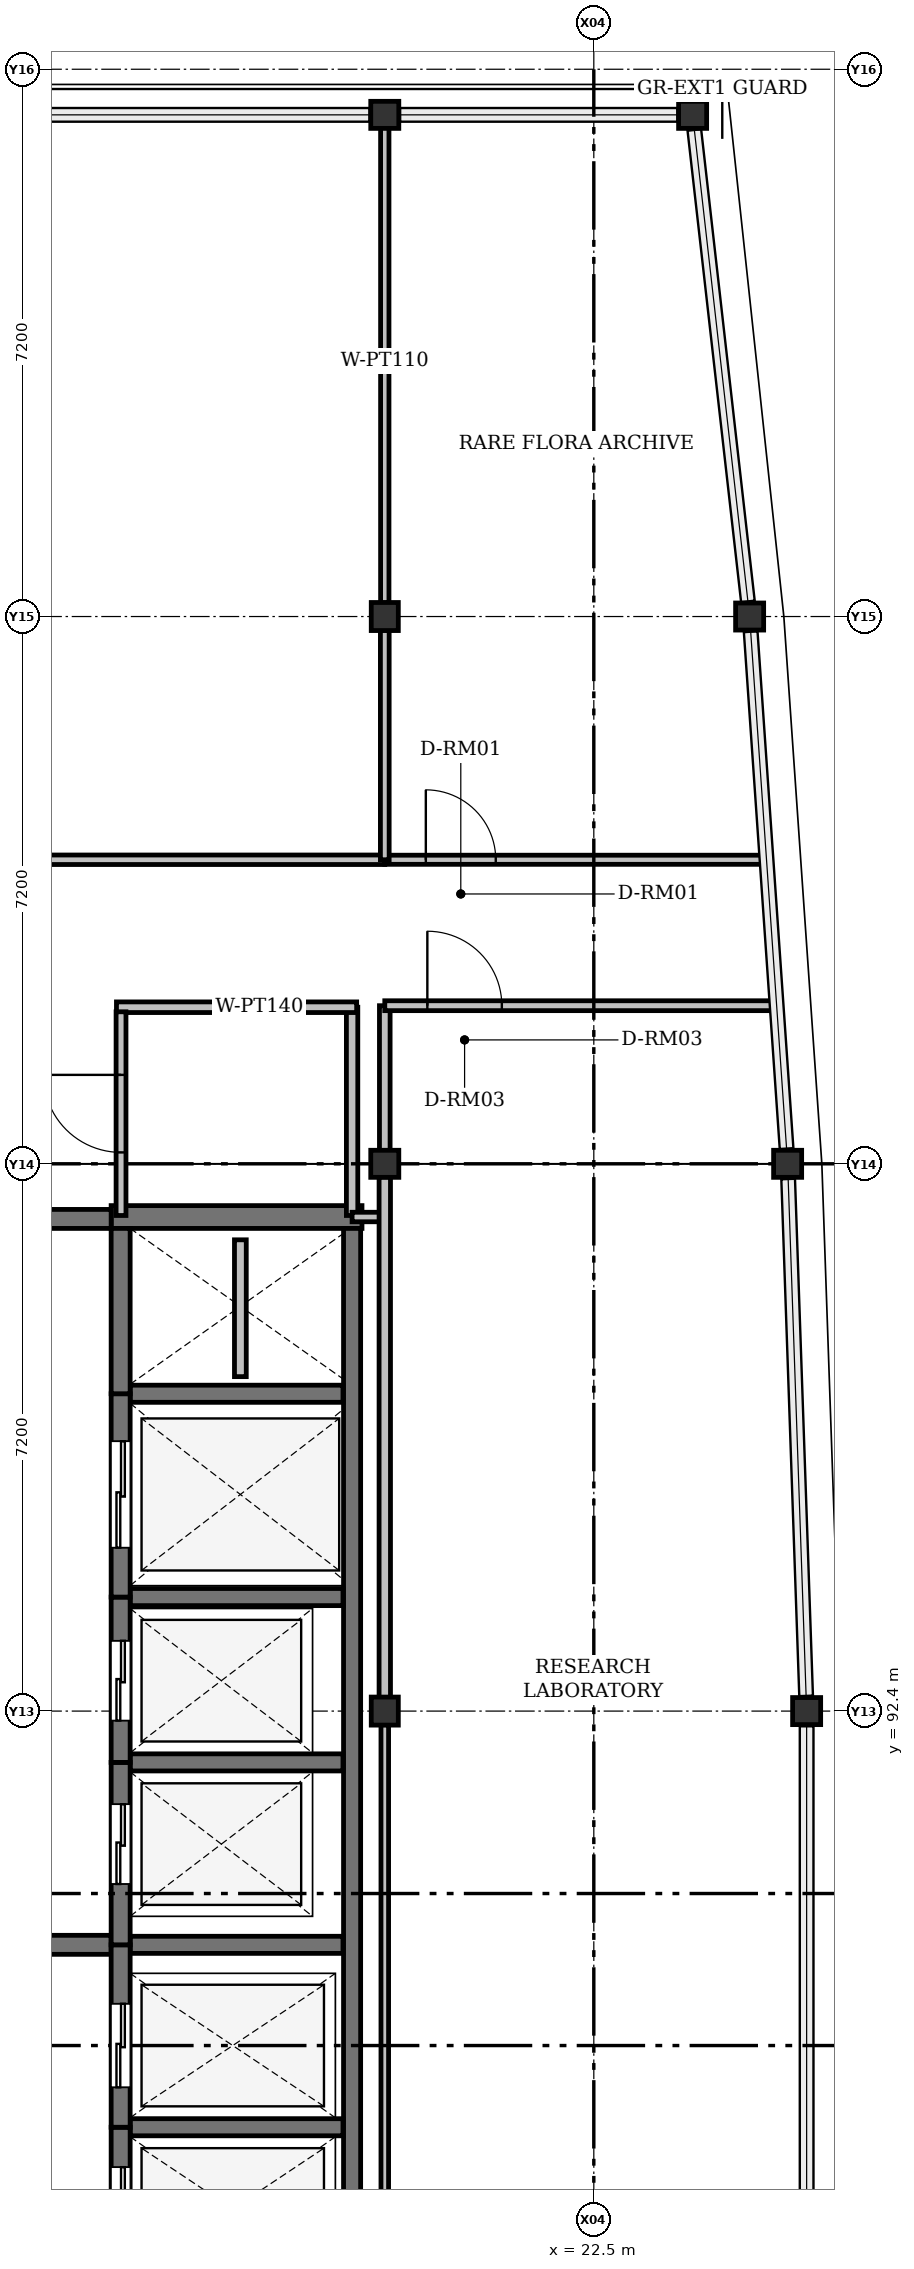
"""IFC4 building model, lengths in metres.
Left out: names, types, materials, properties, quantities, classifications, styles, units other than length and angle.
Written with IfcOpenShell. Run it as: python <this file> out.ifc"""

import sys

from ifc_helpers import new_model, si_unit, direction, frame, frame_2d, origin, origin_2d, place, context, subcontext, project, spatial, rectangle, i_section, extrude, element, fill, save


model = new_model("IFC4")
c1 = context("Model", 3, precision=1e-05, world=origin(), true_north=direction((0.0, 1.0)))
c2 = subcontext(c1, "Body", "Model", "MODEL_VIEW")
j1 = project(units=[si_unit("LENGTHUNIT", "METRE"), si_unit("PLANEANGLEUNIT", "RADIAN")], contexts=[c1])
p1 = place(None, origin())
s1 = spatial("IfcSite", under=j1, at=p1, CompositionType="ELEMENT")
p2 = place(p1, origin())
s2 = spatial("IfcBuilding", under=s1, at=p2, CompositionType="ELEMENT")
p3 = place(p2, frame((0.0, 0.0, 56.1)))
s3 = spatial("IfcBuildingStorey", under=s2, at=p3, CompositionType="ELEMENT", Elevation=56.1)
for number, where, z_axis, x_axis in (
    (1, (19.75, 92.4, 0.0), (0.0, 0.0, 1.0), (0.0, 1.0, 0.0)),
    (2, (25.3, 92.4, 0.0), (0.0, 0.0, 1.0), (1.0, 0.0, 0.0)),
    (3, (19.75, 99.6, 0.0), (0.0, 0.0, 1.0), (1.0, 0.0, 0.0)),
    (4, (25.05, 99.6, 0.0), (0.0, 0.0, 1.0), (1.0, 0.0, 0.0)),
    (5, (19.75, 106.8, 0.0), (0.0, 0.0, 1.0), (0.0, 1.0, 0.0)),
    (6, (24.55, 106.8, 0.0), (0.0, 0.0, 1.0), (1.0, 0.0, 0.0)),
    (7, (19.75, 113.4, 0.0), (0.0, 0.0, 1.0), (1.0, 0.0, 0.0)),
    (8, (23.8, 113.4, 0.0), (0.0, 0.0, 1.0), (1.0, 0.0, 0.0)),
):
    element("IfcColumn", number, at=place(p3, frame(where, z_axis=z_axis, x_axis=x_axis)), inside=s3, PredefinedType="COLUMN", context=c2, shape_type="SweptSolid", body=[
        extrude(i_section(OverallWidth=0.369, OverallDepth=0.356, WebThickness=0.011, FlangeThickness=0.018, FilletRadius=0.015, at=origin_2d()), origin(), (0.0, 0.0, 1.0), 4.2),
    ])
p4 = place(p3, frame((16.15, 98.9, 0.0), z_axis=(0.0, 0.0, 1.0), x_axis=(1.0, 0.0, 0.0)))
e9 = element("IfcWall", 9, at=p4, inside=s3, PredefinedType="SHEAR", context=c2, shape_type="SweptSolid", body=[
    extrude(rectangle(XDim=3.3, YDim=0.3, at=frame_2d((1.65, 0.0))), origin(), (0.0, 0.0, 1.0), 4.2),
])
p5 = place(p3, frame((12.12, 98.875, 0.0), z_axis=(0.0, 0.0, 1.0), x_axis=(1.0, 0.0, 0.0)))
e10 = element("IfcWall", 10, at=p5, inside=s3, PredefinedType="SHEAR", context=c2, shape_type="SweptSolid", body=[
    extrude(rectangle(XDim=4.03, YDim=0.25, at=frame_2d((2.015, 0.0))), origin(), (0.0, 0.0, 1.0), 4.2),
])
p6 = place(p5, frame((1.35, 0.0, 0.0)))
e11 = element("IfcOpeningElement", 11, at=p6, cuts=e10, PredefinedType="OPENING", context=c2, shape_type="SweptSolid", body=[
    extrude(rectangle(XDim=1.3, YDim=2.2, at=frame_2d((0.65, 1.1))), frame((0.0, 0.125, 0.0), z_axis=(0.0, -1.0, 0.0), x_axis=(1.0, 0.0, 0.0)), (0.0, 0.0, 1.0), 0.25),
])
p7 = place(p3, frame((12.12, 89.325, 0.0), z_axis=(0.0, 0.0, 1.0), x_axis=(1.0, 0.0, 0.0)))
e12 = element("IfcWall", 12, at=p7, inside=s3, PredefinedType="SHEAR", context=c2, shape_type="SweptSolid", body=[
    extrude(rectangle(XDim=4.03, YDim=0.25, at=frame_2d((2.015, 0.0))), origin(), (0.0, 0.0, 1.0), 4.2),
])
p8 = place(p7, frame((1.35, 0.0, 0.0)))
e13 = element("IfcOpeningElement", 13, at=p8, cuts=e12, PredefinedType="OPENING", context=c2, shape_type="SweptSolid", body=[
    extrude(rectangle(XDim=1.3, YDim=2.2, at=frame_2d((0.65, 1.1))), frame((0.0, 0.125, 0.0), z_axis=(0.0, -1.0, 0.0), x_axis=(1.0, 0.0, 0.0)), (0.0, 0.0, 1.0), 0.25),
])
p9 = place(p3, frame((19.32, 84.8, 0.0), z_axis=(0.0, 0.0, 1.0), x_axis=(0.0, 1.0, 0.0)))
e14 = element("IfcWall", 14, at=p9, inside=s3, PredefinedType="SHEAR", context=c2, shape_type="SweptSolid", body=[
    extrude(rectangle(XDim=13.95, YDim=0.225, at=frame_2d((6.975, 0.0))), origin(), (0.0, 0.0, 1.0), 4.2),
])
for number, where, z_axis, x_axis in (
    (15, (16.4, 86.925, 0.0), (0.0, 0.0, 1.0), (1.0, 0.0, 0.0)),
    (16, (16.4, 89.325, 0.0), (0.0, 0.0, 1.0), (1.0, 0.0, 0.0)),
    (17, (16.4, 91.725, 0.0), (0.0, 0.0, 1.0), (1.0, 0.0, 0.0)),
    (18, (16.4, 93.9, 0.0), (0.0, 0.0, 1.0), (1.0, 0.0, 0.0)),
    (19, (16.4, 96.575, 0.0), (0.0, 0.0, 1.0), (1.0, 0.0, 0.0)),
):
    element("IfcWall", number, at=place(p3, frame(where, z_axis=z_axis, x_axis=x_axis)), inside=s3, PredefinedType="SHEAR", context=c2, shape_type="SweptSolid", body=[
        extrude(rectangle(XDim=2.8, YDim=0.225, at=frame_2d((1.4, 0.0))), origin(), (0.0, 0.0, 1.0), 4.2),
    ])
p10 = place(p3, frame((16.275, 84.8, 0.0), z_axis=(0.0, 0.0, 1.0), x_axis=(0.0, 1.0, 0.0)))
e20 = element("IfcWall", 20, at=p10, inside=s3, PredefinedType="SHEAR", context=c2, shape_type="SweptSolid", body=[
    extrude(rectangle(XDim=2.125, YDim=0.25, at=frame_2d((1.062, 0.0))), origin(), (0.0, 0.0, 1.0), 4.2),
])
p11 = place(p10, frame((0.5, 0.0, 0.0)))
e21 = element("IfcOpeningElement", 21, at=p11, cuts=e20, PredefinedType="OPENING", context=c2, shape_type="SweptSolid", body=[
    extrude(rectangle(XDim=1.1, YDim=2.15, at=frame_2d((0.55, 1.075))), frame((0.0, 0.125, 0.0), z_axis=(0.0, -1.0, 0.0), x_axis=(1.0, 0.0, 0.0)), (0.0, 0.0, 1.0), 0.25),
])
p12 = place(p3, frame((16.275, 86.925, 0.0), z_axis=(0.0, 0.0, 1.0), x_axis=(0.0, 1.0, 0.0)))
e22 = element("IfcWall", 22, at=p12, inside=s3, PredefinedType="SHEAR", context=c2, shape_type="SweptSolid", body=[
    extrude(rectangle(XDim=2.4, YDim=0.25, at=frame_2d((1.2, 0.0))), origin(), (0.0, 0.0, 1.0), 4.2),
])
p13 = place(p12, frame((0.525, 0.0, 0.0)))
e23 = element("IfcOpeningElement", 23, at=p13, cuts=e22, PredefinedType="OPENING", context=c2, shape_type="SweptSolid", body=[
    extrude(rectangle(XDim=1.1, YDim=2.15, at=frame_2d((0.55, 1.075))), frame((0.0, 0.125, 0.0), z_axis=(0.0, -1.0, 0.0), x_axis=(1.0, 0.0, 0.0)), (0.0, 0.0, 1.0), 0.25),
])
p14 = place(p3, frame((16.275, 89.325, 0.0), z_axis=(0.0, 0.0, 1.0), x_axis=(0.0, 1.0, 0.0)))
e24 = element("IfcWall", 24, at=p14, inside=s3, PredefinedType="SHEAR", context=c2, shape_type="SweptSolid", body=[
    extrude(rectangle(XDim=2.4, YDim=0.25, at=frame_2d((1.2, 0.0))), origin(), (0.0, 0.0, 1.0), 4.2),
])
p15 = place(p14, frame((0.8, 0.0, 0.0)))
e25 = element("IfcOpeningElement", 25, at=p15, cuts=e24, PredefinedType="OPENING", context=c2, shape_type="SweptSolid", body=[
    extrude(rectangle(XDim=1.05, YDim=2.15, at=frame_2d((0.525, 1.075))), frame((0.0, 0.125, 0.0), z_axis=(0.0, -1.0, 0.0), x_axis=(1.0, 0.0, 0.0)), (0.0, 0.0, 1.0), 0.25),
])
p16 = place(p3, frame((16.275, 91.725, 0.0), z_axis=(0.0, 0.0, 1.0), x_axis=(0.0, 1.0, 0.0)))
e26 = element("IfcWall", 26, at=p16, inside=s3, PredefinedType="SHEAR", context=c2, shape_type="SweptSolid", body=[
    extrude(rectangle(XDim=2.175, YDim=0.25, at=frame_2d((1.087, 0.0))), origin(), (0.0, 0.0, 1.0), 4.2),
])
p17 = place(p16, frame((0.55, 0.0, 0.0)))
e27 = element("IfcOpeningElement", 27, at=p17, cuts=e26, PredefinedType="OPENING", context=c2, shape_type="SweptSolid", body=[
    extrude(rectangle(XDim=1.05, YDim=2.15, at=frame_2d((0.525, 1.075))), frame((0.0, 0.125, 0.0), z_axis=(0.0, -1.0, 0.0), x_axis=(1.0, 0.0, 0.0)), (0.0, 0.0, 1.0), 0.25),
])
p18 = place(p3, frame((16.275, 93.9, 0.0), z_axis=(0.0, 0.0, 1.0), x_axis=(0.0, 1.0, 0.0)))
e28 = element("IfcWall", 28, at=p18, inside=s3, PredefinedType="SHEAR", context=c2, shape_type="SweptSolid", body=[
    extrude(rectangle(XDim=2.675, YDim=0.25, at=frame_2d((1.337, 0.0))), origin(), (0.0, 0.0, 1.0), 4.2),
])
p19 = place(p18, frame((0.65, 0.0, 0.0)))
e29 = element("IfcOpeningElement", 29, at=p19, cuts=e28, PredefinedType="OPENING", context=c2, shape_type="SweptSolid", body=[
    extrude(rectangle(XDim=1.4, YDim=2.25, at=frame_2d((0.7, 1.125))), frame((0.0, 0.125, 0.0), z_axis=(0.0, -1.0, 0.0), x_axis=(1.0, 0.0, 0.0)), (0.0, 0.0, 1.0), 0.25),
])
p20 = place(p3, frame((16.275, 96.575, 0.0), z_axis=(0.0, 0.0, 1.0), x_axis=(0.0, 1.0, 0.0)))
e30 = element("IfcWall", 30, at=p20, inside=s3, PredefinedType="SHEAR", context=c2, shape_type="SweptSolid", body=[
    extrude(rectangle(XDim=2.175, YDim=0.25, at=frame_2d((1.087, 0.0))), origin(), (0.0, 0.0, 1.0), 4.2),
])
p21 = place(p3, frame((17.85, 96.8, 0.0), z_axis=(0.0, 0.0, 1.0), x_axis=(0.0, 1.0, 0.0)))
e31 = element("IfcWall", 31, at=p21, inside=s3, PredefinedType="PLUMBINGWALL", context=c2, shape_type="SweptSolid", body=[
    extrude(rectangle(XDim=1.8, YDim=0.155, at=frame_2d((0.9, 0.0))), origin(), (0.0, 0.0, 1.0), 4.2),
])
p22 = place(p3, frame((19.32, 98.92, 0.0), z_axis=(0.0, 0.0, 1.0), x_axis=(0.0, 1.0, 0.0)))
e32 = element("IfcWall", 32, at=p22, inside=s3, PredefinedType="PARTITIONING", context=c2, shape_type="SweptSolid", body=[
    extrude(rectangle(XDim=2.74, YDim=0.15, at=frame_2d((1.37, 0.0))), origin(), (0.0, 0.0, 1.0), 3.436),
])
p23 = place(p3, frame((19.38, 101.66, 0.0), z_axis=(0.0, 0.0, 1.0), x_axis=(-1.0, 0.0, 0.0)))
e33 = element("IfcWall", 33, at=p23, inside=s3, PredefinedType="PARTITIONING", context=c2, shape_type="SweptSolid", body=[
    extrude(rectangle(XDim=3.16, YDim=0.14, at=frame_2d((1.58, 0.0))), origin(), (0.0, 0.0, 1.0), 3.95),
])
p24 = place(p3, frame((16.28, 98.92, 0.0), z_axis=(0.0, 0.0, 1.0), x_axis=(0.0, 1.0, 0.0)))
e34 = element("IfcWall", 34, at=p24, inside=s3, PredefinedType="PARTITIONING", context=c2, shape_type="SweptSolid", body=[
    extrude(rectangle(XDim=2.68, YDim=0.13, at=frame_2d((1.34, 0.0))), origin(), (0.0, 0.0, 1.0), 3.436),
])
p25 = place(p24, frame((0.83, 0.0, 0.0)))
e35 = element("IfcOpeningElement", 35, at=p25, cuts=e34, PredefinedType="OPENING", context=c2, shape_type="SweptSolid", body=[
    extrude(rectangle(XDim=1.02, YDim=2.08, at=frame_2d((0.51, 1.04))), frame((0.0, 0.065, 0.0), z_axis=(0.0, -1.0, 0.0), x_axis=(1.0, 0.0, 0.0)), (0.0, 0.0, 1.0), 0.13),
])
p26 = place(p3, frame((19.75, 98.9, 0.0), z_axis=(0.0, 0.0, 1.0), x_axis=(-1.0, 0.0, 0.0)))
e36 = element("IfcWall", 36, at=p26, inside=s3, PredefinedType="PARTITIONING", context=c2, shape_type="SweptSolid", body=[
    extrude(rectangle(XDim=0.43, YDim=0.125, at=frame_2d((0.215, 0.0))), origin(), (0.0, 0.0, 1.0), 3.512),
])
p27 = place(p3, frame((0.65, 103.6, 0.0), z_axis=(0.0, 0.0, 1.0), x_axis=(1.0, 0.0, 0.0)))
e37 = element("IfcWall", 37, at=p27, inside=s3, PredefinedType="PARTITIONING", context=c2, shape_type="SweptSolid", body=[
    extrude(rectangle(XDim=19.1, YDim=0.125, at=frame_2d((9.55, 0.0))), origin(), (0.0, 0.0, 1.0), 3.512),
])
p28 = place(p27, frame((9.11, 0.0, 0.0)))
e38 = element("IfcOpeningElement", 38, at=p28, cuts=e37, PredefinedType="OPENING", context=c2, shape_type="SweptSolid", body=[
    extrude(rectangle(XDim=1.68, YDim=2.35, at=frame_2d((0.84, 1.175))), frame((0.0, 0.062, 0.0), z_axis=(0.0, -1.0, 0.0), x_axis=(1.0, 0.0, 0.0)), (0.0, 0.0, 1.0), 0.125),
])
p29 = place(p27, frame((11.64, 0.0, 0.92)))
e39 = element("IfcOpeningElement", 39, at=p29, cuts=e37, PredefinedType="OPENING", context=c2, shape_type="SweptSolid", body=[
    extrude(rectangle(XDim=1.45, YDim=1.3, at=frame_2d((0.725, 0.65))), frame((0.0, 0.062, 0.0), z_axis=(0.0, -1.0, 0.0), x_axis=(1.0, 0.0, 0.0)), (0.0, 0.0, 1.0), 0.125),
])
p30 = place(p3, frame((19.75, 103.6, 0.0), z_axis=(0.0, 0.0, 1.0), x_axis=(1.0, 0.0, 0.0)))
e40 = element("IfcWall", 40, at=p30, inside=s3, PredefinedType="PARTITIONING", context=c2, shape_type="SweptSolid", body=[
    extrude(rectangle(XDim=5.04, YDim=0.12, at=frame_2d((2.52, 0.0))), origin(), (0.0, 0.0, 1.0), 3.512),
])
p31 = place(p30, frame((0.54, 0.0, 0.0)))
e41 = element("IfcOpeningElement", 41, at=p31, cuts=e40, PredefinedType="OPENING", context=c2, shape_type="SweptSolid", body=[
    extrude(rectangle(XDim=0.92, YDim=2.1, at=frame_2d((0.46, 1.05))), frame((0.0, 0.06, 0.0), z_axis=(0.0, -1.0, 0.0), x_axis=(1.0, 0.0, 0.0)), (0.0, 0.0, 1.0), 0.12),
])
p32 = place(p3, frame((19.75, 106.621, 0.0), z_axis=(0.0, 0.0, 1.0), x_axis=(0.0, -1.0, 0.0)))
e42 = element("IfcWall", 42, at=p32, inside=s3, PredefinedType="PARTITIONING", context=c2, shape_type="SweptSolid", body=[
    extrude(rectangle(XDim=3.021, YDim=0.115, at=frame_2d((1.51, 0.0))), origin(), (0.0, 0.0, 1.0), 3.512),
])
p33 = place(p3, frame((19.75, 113.35, 0.0), z_axis=(0.0, 0.0, 1.0), x_axis=(0.0, -1.0, 0.0)))
e43 = element("IfcWall", 43, at=p33, inside=s3, PredefinedType="PARTITIONING", context=c2, shape_type="SweptSolid", body=[
    extrude(rectangle(XDim=6.371, YDim=0.11, at=frame_2d((3.185, 0.0))), origin(), (0.0, 0.0, 1.0), 3.512),
])
p34 = place(p3, frame((19.75, 85.373, 0.0), z_axis=(0.0, 0.0, 1.0), x_axis=(0.0, 1.0, 0.0)))
e44 = element("IfcWall", 44, at=p34, inside=s3, PredefinedType="PARTITIONING", context=c2, shape_type="SweptSolid", body=[
    extrude(rectangle(XDim=6.847, YDim=0.1, at=frame_2d((3.424, 0.0))), origin(), (0.0, 0.0, 1.0), 3.512),
])
p35 = place(p3, frame((19.75, 92.58, 0.0), z_axis=(0.0, 0.0, 1.0), x_axis=(0.0, 1.0, 0.0)))
e45 = element("IfcWall", 45, at=p35, inside=s3, PredefinedType="PARTITIONING", context=c2, shape_type="SweptSolid", body=[
    extrude(rectangle(XDim=6.847, YDim=0.15, at=frame_2d((3.424, 0.0))), origin(), (0.0, 0.0, 1.0), 3.512),
])
p36 = place(p3, frame((19.75, 99.773, 0.0), z_axis=(0.0, 0.0, 1.0), x_axis=(0.0, 1.0, 0.0)))
e46 = element("IfcWall", 46, at=p36, inside=s3, PredefinedType="PARTITIONING", context=c2, shape_type="SweptSolid", body=[
    extrude(rectangle(XDim=1.907, YDim=0.14, at=frame_2d((0.954, 0.0))), origin(), (0.0, 0.0, 1.0), 3.512),
])
p37 = place(p3, frame((19.75, 101.68, 0.0), z_axis=(0.0, 0.0, 1.0), x_axis=(1.0, 0.0, 0.0)))
e47 = element("IfcWall", 47, at=p37, inside=s3, PredefinedType="PARTITIONING", context=c2, shape_type="SweptSolid", body=[
    extrude(rectangle(XDim=5.165, YDim=0.13, at=frame_2d((2.583, 0.0))), origin(), (0.0, 0.0, 1.0), 3.512),
])
p38 = place(p37, frame((0.56, 0.0, 0.0)))
e48 = element("IfcOpeningElement", 48, at=p38, cuts=e47, PredefinedType="OPENING", context=c2, shape_type="SweptSolid", body=[
    extrude(rectangle(XDim=0.98, YDim=2.1, at=frame_2d((0.49, 1.05))), frame((0.0, 0.065, 0.0), z_axis=(0.0, -1.0, 0.0), x_axis=(1.0, 0.0, 0.0)), (0.0, 0.0, 1.0), 0.13),
])
p39 = place(p11, origin())
e49 = element("IfcDoor", 49, at=p39, inside=s3, OperationType="SLIDING_TO_LEFT", PredefinedType="DOOR", context=c2, shape_type="SweptSolid", body=[
    extrude(rectangle(XDim=1.1, YDim=2.15, at=frame_2d((0.55, 1.075))), frame((0.0, 0.025, 0.0), z_axis=(0.0, -1.0, 0.0), x_axis=(1.0, 0.0, 0.0)), (0.0, 0.0, 1.0), 0.05),
])
fill(e21, e49)
p40 = place(p13, origin())
e50 = element("IfcDoor", 50, at=p40, inside=s3, OperationType="SLIDING_TO_LEFT", PredefinedType="DOOR", context=c2, shape_type="SweptSolid", body=[
    extrude(rectangle(XDim=1.1, YDim=2.15, at=frame_2d((0.55, 1.075))), frame((0.0, 0.025, 0.0), z_axis=(0.0, -1.0, 0.0), x_axis=(1.0, 0.0, 0.0)), (0.0, 0.0, 1.0), 0.05),
])
fill(e23, e50)
p41 = place(p15, origin())
e51 = element("IfcDoor", 51, at=p41, inside=s3, OperationType="SLIDING_TO_LEFT", PredefinedType="DOOR", context=c2, shape_type="SweptSolid", body=[
    extrude(rectangle(XDim=1.05, YDim=2.15, at=frame_2d((0.525, 1.075))), frame((0.0, 0.025, 0.0), z_axis=(0.0, -1.0, 0.0), x_axis=(1.0, 0.0, 0.0)), (0.0, 0.0, 1.0), 0.05),
])
fill(e25, e51)
p42 = place(p17, origin())
e52 = element("IfcDoor", 52, at=p42, inside=s3, OperationType="SLIDING_TO_LEFT", PredefinedType="DOOR", context=c2, shape_type="SweptSolid", body=[
    extrude(rectangle(XDim=1.05, YDim=2.15, at=frame_2d((0.525, 1.075))), frame((0.0, 0.025, 0.0), z_axis=(0.0, -1.0, 0.0), x_axis=(1.0, 0.0, 0.0)), (0.0, 0.0, 1.0), 0.05),
])
fill(e27, e52)
p43 = place(p19, origin())
e53 = element("IfcDoor", 53, at=p43, inside=s3, OperationType="SLIDING_TO_LEFT", PredefinedType="DOOR", context=c2, shape_type="SweptSolid", body=[
    extrude(rectangle(XDim=1.4, YDim=2.25, at=frame_2d((0.7, 1.125))), frame((0.0, 0.025, 0.0), z_axis=(0.0, -1.0, 0.0), x_axis=(1.0, 0.0, 0.0)), (0.0, 0.0, 1.0), 0.05),
])
fill(e29, e53)
p44 = place(p25, origin())
e54 = element("IfcDoor", 54, at=p44, inside=s3, OperationType="SINGLE_SWING_RIGHT", PredefinedType="DOOR", context=c2, shape_type="SweptSolid", body=[
    extrude(rectangle(XDim=1.02, YDim=2.08, at=frame_2d((0.51, 1.04))), frame((0.0, 0.025, 0.0), z_axis=(0.0, -1.0, 0.0), x_axis=(1.0, 0.0, 0.0)), (0.0, 0.0, 1.0), 0.05),
])
fill(e35, e54)
p45 = place(p31, origin())
e55 = element("IfcDoor", 55, at=p45, inside=s3, OperationType="SINGLE_SWING_LEFT", PredefinedType="DOOR", context=c2, shape_type="SweptSolid", body=[
    extrude(rectangle(XDim=0.92, YDim=2.1, at=frame_2d((0.46, 1.05))), frame((0.0, 0.025, 0.0), z_axis=(0.0, -1.0, 0.0), x_axis=(1.0, 0.0, 0.0)), (0.0, 0.0, 1.0), 0.05),
])
fill(e41, e55)
p46 = place(p38, origin())
e56 = element("IfcDoor", 56, at=p46, inside=s3, OperationType="SINGLE_SWING_LEFT", PredefinedType="DOOR", context=c2, shape_type="SweptSolid", body=[
    extrude(rectangle(XDim=0.98, YDim=2.1, at=frame_2d((0.49, 1.05))), frame((0.0, 0.025, 0.0), z_axis=(0.0, -1.0, 0.0), x_axis=(1.0, 0.0, 0.0)), (0.0, 0.0, 1.0), 0.05),
])
fill(e48, e56)
save(model, sys.argv[1])
